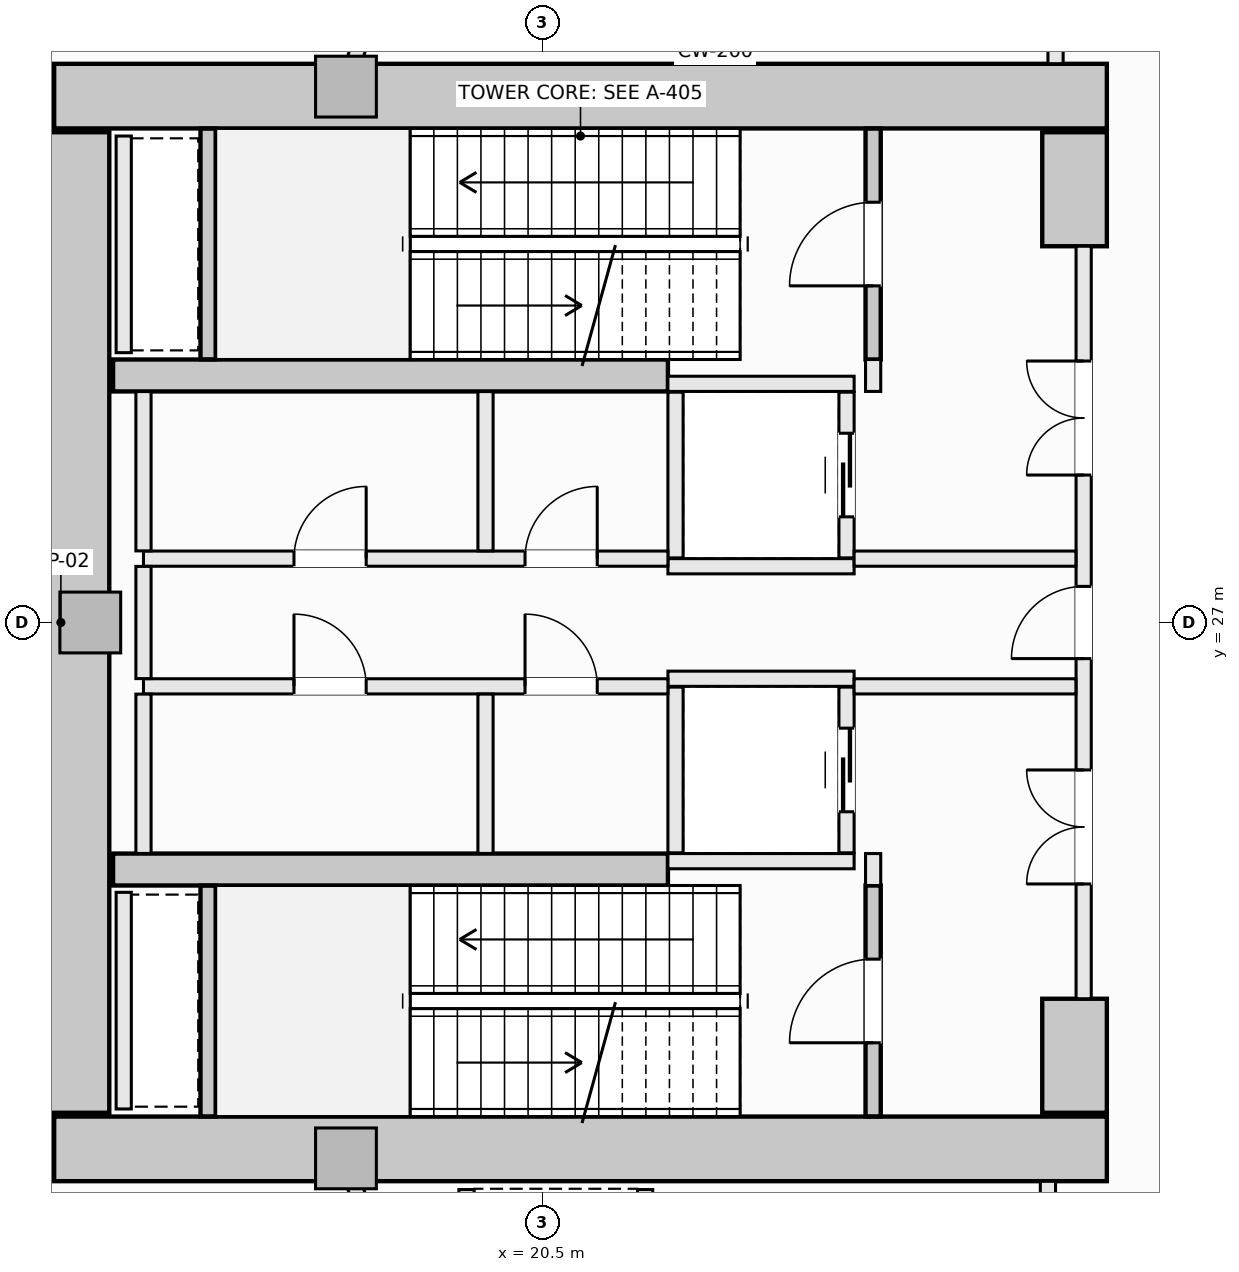
"""IFC4 building model, lengths in metres.
Left out: names, types, materials, properties, quantities, classifications, styles, units other than length and angle.
Written with IfcOpenShell. Run it as: python <this file> out.ifc"""

import sys

from ifc_helpers import new_model, si_unit, direction, frame, frame_2d, origin, origin_2d, place, context, subcontext, project, spatial, rectangle, extrude, element, fill, save


model = new_model("IFC4")
c1 = context("Model", 3, precision=1e-05, world=origin(), true_north=direction((0.0, 1.0)))
c2 = subcontext(c1, "Body", "Model", "MODEL_VIEW")
j1 = project(units=[si_unit("LENGTHUNIT", "METRE"), si_unit("PLANEANGLEUNIT", "RADIAN")], contexts=[c1])
p1 = place(None, origin())
s1 = spatial("IfcSite", under=j1, at=p1, CompositionType="ELEMENT")
p2 = place(p1, origin())
s2 = spatial("IfcBuilding", under=s1, at=p2, CompositionType="ELEMENT")
p3 = place(p2, frame((0.0, 0.0, 95.8)))
s3 = spatial("IfcBuildingStorey", under=s2, at=p3, CompositionType="ELEMENT", Elevation=95.8)
for number, where, z_axis, x_axis in (
    (1, (14.075, 33.925, -0.32), (0.0, 0.0, 1.0), (1.0, 0.0, 0.0)),
    (2, (14.075, 20.075, -0.32), (0.0, 0.0, 1.0), (1.0, 0.0, 0.0)),
):
    element("IfcWall", number, at=place(p3, frame(where, z_axis=z_axis, x_axis=x_axis)), inside=s3, PredefinedType="SHEAR", context=c2, shape_type="SweptSolid", body=[
        extrude(rectangle(XDim=13.85, YDim=0.85, at=frame_2d((6.925, 0.0))), origin(), (0.0, 0.0, 1.0), 5.04),
    ])
p4 = place(p3, frame((14.375, 20.55, -0.32), z_axis=(0.0, 0.0, 1.0), x_axis=(0.0, 1.0, 0.0)))
e3 = element("IfcWall", 3, at=p4, inside=s3, PredefinedType="SHEAR", context=c2, shape_type="SweptSolid", body=[
    extrude(rectangle(XDim=12.9, YDim=0.85, at=frame_2d((6.45, 0.0))), origin(), (0.0, 0.0, 1.0), 5.04),
])
for number, where, z_axis, x_axis in (
    (4, (27.5, 31.95, -0.32), (0.0, 0.0, 1.0), (0.0, 1.0, 0.0)),
    (5, (27.5, 20.55, -0.32), (0.0, 0.0, 1.0), (0.0, 1.0, 0.0)),
):
    element("IfcWall", number, at=place(p3, frame(where, z_axis=z_axis, x_axis=x_axis)), inside=s3, PredefinedType="SHEAR", context=c2, shape_type="SweptSolid", body=[
        extrude(rectangle(XDim=1.5, YDim=0.85, at=frame_2d((0.75, 0.0))), origin(), (0.0, 0.0, 1.0), 5.04),
    ])
for number, where, z_axis, x_axis in (
    (6, (14.85, 30.25, -0.32), (0.0, 0.0, 1.0), (1.0, 0.0, 0.0)),
    (7, (14.85, 23.75, -0.32), (0.0, 0.0, 1.0), (1.0, 0.0, 0.0)),
):
    element("IfcWall", number, at=place(p3, frame(where, z_axis=z_axis, x_axis=x_axis)), inside=s3, PredefinedType="SHEAR", context=c2, shape_type="SweptSolid", body=[
        extrude(rectangle(XDim=7.3, YDim=0.42, at=frame_2d((3.65, 0.0))), origin(), (0.0, 0.0, 1.0), 5.04),
    ])
for number, where, z_axis, x_axis in (
    (8, (17.914, 34.05, -0.32), (0.0, 0.0, 1.0), (1.0, 0.0, 0.0)),
    (9, (14.55, 27.0, -0.32), (0.0, 0.0, 1.0), (1.0, 0.0, 0.0)),
    (10, (17.914, 19.95, -0.32), (0.0, 0.0, 1.0), (1.0, 0.0, 0.0)),
):
    element("IfcColumn", number, at=place(p3, frame(where, z_axis=z_axis, x_axis=x_axis)), inside=s3, PredefinedType="PILASTER", context=c2, shape_type="SweptSolid", body=[
        extrude(rectangle(XDim=0.8, YDim=0.8, at=origin_2d()), origin(), (0.0, 0.0, 1.0), 5.04),
    ])
p5 = place(p3, frame((24.85, 30.46, -0.32), z_axis=(0.0, 0.0, 1.0), x_axis=(0.0, 1.0, 0.0)))
e11 = element("IfcWall", 11, at=p5, inside=s3, PredefinedType="SHEAR", context=c2, shape_type="SweptSolid", body=[
    extrude(rectangle(XDim=3.038, YDim=0.2, at=frame_2d((1.519, 0.0))), origin(), (0.0, 0.0, 1.0), 5.04),
])
p6 = place(p5, frame((0.969, 0.0, 0.32)))
e12 = element("IfcOpeningElement", 12, at=p6, cuts=e11, PredefinedType="OPENING", context=c2, shape_type="SweptSolid", body=[
    extrude(rectangle(XDim=1.1, YDim=2.15, at=frame_2d((0.55, 1.075))), frame((0.0, 0.11, 0.0), z_axis=(0.0, -1.0, 0.0), x_axis=(1.0, 0.0, 0.0)), (0.0, 0.0, 1.0), 0.22),
])
p7 = place(p3, frame((16.1, 30.462, -0.32), z_axis=(0.0, 0.0, 1.0), x_axis=(0.0, 1.0, 0.0)))
e13 = element("IfcWall", 13, at=p7, inside=s3, PredefinedType="SHEAR", context=c2, shape_type="SweptSolid", body=[
    extrude(rectangle(XDim=3.036, YDim=0.2, at=frame_2d((1.518, 0.0))), origin(), (0.0, 0.0, 1.0), 5.04),
])
p8 = place(p3, frame((24.85, 20.502, -0.32), z_axis=(0.0, 0.0, 1.0), x_axis=(0.0, 1.0, 0.0)))
e14 = element("IfcWall", 14, at=p8, inside=s3, PredefinedType="SHEAR", context=c2, shape_type="SweptSolid", body=[
    extrude(rectangle(XDim=3.038, YDim=0.2, at=frame_2d((1.519, 0.0))), origin(), (0.0, 0.0, 1.0), 5.04),
])
p9 = place(p8, frame((0.969, 0.0, 0.32)))
e15 = element("IfcOpeningElement", 15, at=p9, cuts=e14, PredefinedType="OPENING", context=c2, shape_type="SweptSolid", body=[
    extrude(rectangle(XDim=1.1, YDim=2.15, at=frame_2d((0.55, 1.075))), frame((0.0, 0.11, 0.0), z_axis=(0.0, -1.0, 0.0), x_axis=(1.0, 0.0, 0.0)), (0.0, 0.0, 1.0), 0.22),
])
p10 = place(p3, frame((16.1, 20.502, -0.32), z_axis=(0.0, 0.0, 1.0), x_axis=(0.0, 1.0, 0.0)))
e16 = element("IfcWall", 16, at=p10, inside=s3, PredefinedType="SHEAR", context=c2, shape_type="SweptSolid", body=[
    extrude(rectangle(XDim=3.036, YDim=0.2, at=frame_2d((1.518, 0.0))), origin(), (0.0, 0.0, 1.0), 5.04),
])
for number, where, z_axis, x_axis in (
    (17, (22.15, 30.14, 0.0), (0.0, 0.0, 1.0), (1.0, 0.0, 0.0)),
    (18, (22.15, 27.74, 0.0), (0.0, 0.0, 1.0), (1.0, 0.0, 0.0)),
):
    element("IfcWall", number, at=place(p3, frame(where, z_axis=z_axis, x_axis=x_axis)), inside=s3, PredefinedType="SOLIDWALL", context=c2, shape_type="SweptSolid", body=[
        extrude(rectangle(XDim=2.45, YDim=0.2, at=frame_2d((1.225, 0.0))), origin(), (0.0, 0.0, 1.0), 4.72),
    ])
p11 = place(p3, frame((22.25, 27.85, 0.0), z_axis=(0.0, 0.0, 1.0), x_axis=(0.0, 1.0, 0.0)))
e19 = element("IfcWall", 19, at=p11, inside=s3, PredefinedType="SOLIDWALL", context=c2, shape_type="SweptSolid", body=[
    extrude(rectangle(XDim=2.18, YDim=0.2, at=frame_2d((1.09, 0.0))), origin(), (0.0, 0.0, 1.0), 4.72),
])
p12 = place(p3, frame((24.5, 27.85, 0.0), z_axis=(0.0, 0.0, 1.0), x_axis=(0.0, 1.0, 0.0)))
e20 = element("IfcWall", 20, at=p12, inside=s3, PredefinedType="SOLIDWALL", context=c2, shape_type="SweptSolid", body=[
    extrude(rectangle(XDim=2.18, YDim=0.2, at=frame_2d((1.09, 0.0))), origin(), (0.0, 0.0, 1.0), 4.72),
])
p13 = place(p12, frame((0.54, 0.0, 0.0)))
e21 = element("IfcOpeningElement", 21, at=p13, cuts=e20, PredefinedType="OPENING", context=c2, shape_type="SweptSolid", body=[
    extrude(rectangle(XDim=1.1, YDim=2.2, at=frame_2d((0.55, 1.1))), frame((0.0, 0.11, 0.0), z_axis=(0.0, -1.0, 0.0), x_axis=(1.0, 0.0, 0.0)), (0.0, 0.0, 1.0), 0.22),
])
for number, where, z_axis, x_axis in (
    (22, (22.15, 26.26, 0.0), (0.0, 0.0, 1.0), (1.0, 0.0, 0.0)),
    (23, (22.15, 23.86, 0.0), (0.0, 0.0, 1.0), (1.0, 0.0, 0.0)),
):
    element("IfcWall", number, at=place(p3, frame(where, z_axis=z_axis, x_axis=x_axis)), inside=s3, PredefinedType="SOLIDWALL", context=c2, shape_type="SweptSolid", body=[
        extrude(rectangle(XDim=2.45, YDim=0.2, at=frame_2d((1.225, 0.0))), origin(), (0.0, 0.0, 1.0), 4.72),
    ])
p14 = place(p3, frame((22.25, 23.97, 0.0), z_axis=(0.0, 0.0, 1.0), x_axis=(0.0, 1.0, 0.0)))
e24 = element("IfcWall", 24, at=p14, inside=s3, PredefinedType="SOLIDWALL", context=c2, shape_type="SweptSolid", body=[
    extrude(rectangle(XDim=2.18, YDim=0.2, at=frame_2d((1.09, 0.0))), origin(), (0.0, 0.0, 1.0), 4.72),
])
p15 = place(p3, frame((24.5, 23.97, 0.0), z_axis=(0.0, 0.0, 1.0), x_axis=(0.0, 1.0, 0.0)))
e25 = element("IfcWall", 25, at=p15, inside=s3, PredefinedType="SOLIDWALL", context=c2, shape_type="SweptSolid", body=[
    extrude(rectangle(XDim=2.18, YDim=0.2, at=frame_2d((1.09, 0.0))), origin(), (0.0, 0.0, 1.0), 4.72),
])
p16 = place(p15, frame((0.54, 0.0, 0.0)))
e26 = element("IfcOpeningElement", 26, at=p16, cuts=e25, PredefinedType="OPENING", context=c2, shape_type="SweptSolid", body=[
    extrude(rectangle(XDim=1.1, YDim=2.2, at=frame_2d((0.55, 1.1))), frame((0.0, 0.11, 0.0), z_axis=(0.0, -1.0, 0.0), x_axis=(1.0, 0.0, 0.0)), (0.0, 0.0, 1.0), 0.22),
])
for number, where, z_axis, x_axis in (
    (27, (19.5, 17.01, 0.0), (0.0, 0.0, 1.0), (0.0, 1.0, 0.0)),
    (28, (21.85, 17.01, 0.0), (0.0, 0.0, 1.0), (0.0, 1.0, 0.0)),
):
    element("IfcWall", number, at=place(p3, frame(where, z_axis=z_axis, x_axis=x_axis)), inside=s3, PredefinedType="SOLIDWALL", context=c2, shape_type="SweptSolid", body=[
        extrude(rectangle(XDim=2.53, YDim=0.2, at=frame_2d((1.265, 0.0))), origin(), (0.0, 0.0, 1.0), 4.72),
    ])
for number, where, z_axis, x_axis in (
    (29, (14.99, 30.55, 0.0), (0.0, 0.0, 1.0), (0.0, 1.0, 0.0)),
    (30, (14.99, 20.6, 0.0), (0.0, 0.0, 1.0), (0.0, 1.0, 0.0)),
):
    element("IfcWall", number, at=place(p3, frame(where, z_axis=z_axis, x_axis=x_axis)), inside=s3, PredefinedType="SOLIDWALL", context=c2, shape_type="SweptSolid", body=[
        extrude(rectangle(XDim=2.85, YDim=0.2, at=frame_2d((1.425, 0.0))), origin(), (0.0, 0.0, 1.0), 4.72),
    ])
for number, where, z_axis, x_axis in (
    (31, (24.85, 23.54, 0.0), (0.0, 0.0, 1.0), (0.0, 1.0, 0.0)),
    (32, (24.85, 30.04, 0.0), (0.0, 0.0, 1.0), (0.0, 1.0, 0.0)),
):
    element("IfcWall", number, at=place(p3, frame(where, z_axis=z_axis, x_axis=x_axis)), inside=s3, PredefinedType="SOLIDWALL", context=c2, shape_type="SweptSolid", body=[
        extrude(rectangle(XDim=0.42, YDim=0.2, at=frame_2d((0.21, 0.0))), origin(), (0.0, 0.0, 1.0), 4.72),
    ])
p17 = place(p3, frame((27.62, 22.05, 0.0), z_axis=(0.0, 0.0, 1.0), x_axis=(0.0, 1.0, 0.0)))
e33 = element("IfcWall", 33, at=p17, inside=s3, PredefinedType="SOLIDWALL", context=c2, shape_type="SweptSolid", body=[
    extrude(rectangle(XDim=9.9, YDim=0.2, at=frame_2d((4.95, 0.0))), origin(), (0.0, 0.0, 1.0), 3.812),
])
p18 = place(p17, frame((4.475, 0.0, 0.0)))
e34 = element("IfcOpeningElement", 34, at=p18, cuts=e33, PredefinedType="OPENING", context=c2, shape_type="SweptSolid", body=[
    extrude(rectangle(XDim=0.95, YDim=2.1, at=frame_2d((0.475, 1.05))), frame((0.0, 0.11, 0.0), z_axis=(0.0, -1.0, 0.0), x_axis=(1.0, 0.0, 0.0)), (0.0, 0.0, 1.0), 0.22),
])
p19 = place(p17, frame((6.89, 0.0, 0.0)))
e35 = element("IfcOpeningElement", 35, at=p19, cuts=e33, PredefinedType="OPENING", context=c2, shape_type="SweptSolid", body=[
    extrude(rectangle(XDim=1.5, YDim=2.2, at=frame_2d((0.75, 1.1))), frame((0.0, 0.11, 0.0), z_axis=(0.0, -1.0, 0.0), x_axis=(1.0, 0.0, 0.0)), (0.0, 0.0, 1.0), 0.22),
])
p20 = place(p17, frame((1.51, 0.0, 0.0)))
e36 = element("IfcOpeningElement", 36, at=p20, cuts=e33, PredefinedType="OPENING", context=c2, shape_type="SweptSolid", body=[
    extrude(rectangle(XDim=1.5, YDim=2.2, at=frame_2d((0.75, 1.1))), frame((0.0, 0.11, 0.0), z_axis=(0.0, -1.0, 0.0), x_axis=(1.0, 0.0, 0.0)), (0.0, 0.0, 1.0), 0.22),
])
p21 = place(p3, frame((15.25, 27.84, 0.0), z_axis=(0.0, 0.0, 1.0), x_axis=(1.0, 0.0, 0.0)))
e37 = element("IfcWall", 37, at=p21, inside=s3, PredefinedType="SOLIDWALL", context=c2, shape_type="SweptSolid", body=[
    extrude(rectangle(XDim=6.9, YDim=0.2, at=frame_2d((3.45, 0.0))), origin(), (0.0, 0.0, 1.0), 4.72),
])
p22 = place(p21, frame((5.02, 0.0, 0.0)))
e38 = element("IfcOpeningElement", 38, at=p22, cuts=e37, PredefinedType="OPENING", context=c2, shape_type="SweptSolid", body=[
    extrude(rectangle(XDim=0.95, YDim=2.1, at=frame_2d((0.475, 1.05))), frame((0.0, 0.11, 0.0), z_axis=(0.0, -1.0, 0.0), x_axis=(1.0, 0.0, 0.0)), (0.0, 0.0, 1.0), 0.22),
])
p23 = place(p21, frame((1.98, 0.0, 0.0)))
e39 = element("IfcOpeningElement", 39, at=p23, cuts=e37, PredefinedType="OPENING", context=c2, shape_type="SweptSolid", body=[
    extrude(rectangle(XDim=0.95, YDim=2.1, at=frame_2d((0.475, 1.05))), frame((0.0, 0.11, 0.0), z_axis=(0.0, -1.0, 0.0), x_axis=(1.0, 0.0, 0.0)), (0.0, 0.0, 1.0), 0.22),
])
p24 = place(p3, frame((24.6, 27.84, 0.0), z_axis=(0.0, 0.0, 1.0), x_axis=(1.0, 0.0, 0.0)))
e40 = element("IfcWall", 40, at=p24, inside=s3, PredefinedType="SOLIDWALL", context=c2, shape_type="SweptSolid", body=[
    extrude(rectangle(XDim=2.918, YDim=0.2, at=frame_2d((1.459, 0.0))), origin(), (0.0, 0.0, 1.0), 4.72),
])
p25 = place(p3, frame((15.25, 26.16, 0.0), z_axis=(0.0, 0.0, 1.0), x_axis=(1.0, 0.0, 0.0)))
e41 = element("IfcWall", 41, at=p25, inside=s3, PredefinedType="SOLIDWALL", context=c2, shape_type="SweptSolid", body=[
    extrude(rectangle(XDim=6.9, YDim=0.2, at=frame_2d((3.45, 0.0))), origin(), (0.0, 0.0, 1.0), 4.72),
])
p26 = place(p25, frame((5.02, 0.0, 0.0)))
e42 = element("IfcOpeningElement", 42, at=p26, cuts=e41, PredefinedType="OPENING", context=c2, shape_type="SweptSolid", body=[
    extrude(rectangle(XDim=0.95, YDim=2.1, at=frame_2d((0.475, 1.05))), frame((0.0, 0.11, 0.0), z_axis=(0.0, -1.0, 0.0), x_axis=(1.0, 0.0, 0.0)), (0.0, 0.0, 1.0), 0.22),
])
p27 = place(p25, frame((1.98, 0.0, 0.0)))
e43 = element("IfcOpeningElement", 43, at=p27, cuts=e41, PredefinedType="OPENING", context=c2, shape_type="SweptSolid", body=[
    extrude(rectangle(XDim=0.95, YDim=2.1, at=frame_2d((0.475, 1.05))), frame((0.0, 0.11, 0.0), z_axis=(0.0, -1.0, 0.0), x_axis=(1.0, 0.0, 0.0)), (0.0, 0.0, 1.0), 0.22),
])
p28 = place(p3, frame((24.6, 26.16, 0.0), z_axis=(0.0, 0.0, 1.0), x_axis=(1.0, 0.0, 0.0)))
e44 = element("IfcWall", 44, at=p28, inside=s3, PredefinedType="SOLIDWALL", context=c2, shape_type="SweptSolid", body=[
    extrude(rectangle(XDim=2.918, YDim=0.2, at=frame_2d((1.459, 0.0))), origin(), (0.0, 0.0, 1.0), 4.72),
])
p29 = place(p3, frame((15.25, 23.962, 0.0), z_axis=(0.0, 0.0, 1.0), x_axis=(0.0, 1.0, 0.0)))
e45 = element("IfcWall", 45, at=p29, inside=s3, PredefinedType="SOLIDWALL", context=c2, shape_type="SweptSolid", body=[
    extrude(rectangle(XDim=2.096, YDim=0.2, at=frame_2d((1.048, 0.0))), origin(), (0.0, 0.0, 1.0), 4.72),
])
p30 = place(p3, frame((15.25, 26.262, 0.0), z_axis=(0.0, 0.0, 1.0), x_axis=(0.0, 1.0, 0.0)))
e46 = element("IfcWall", 46, at=p30, inside=s3, PredefinedType="SOLIDWALL", context=c2, shape_type="SweptSolid", body=[
    extrude(rectangle(XDim=1.476, YDim=0.2, at=frame_2d((0.738, 0.0))), origin(), (0.0, 0.0, 1.0), 4.72),
])
for number, where, z_axis, x_axis in (
    (47, (15.25, 27.942, 0.0), (0.0, 0.0, 1.0), (0.0, 1.0, 0.0)),
    (48, (19.75, 23.962, 0.0), (0.0, 0.0, 1.0), (0.0, 1.0, 0.0)),
    (49, (19.75, 27.942, 0.0), (0.0, 0.0, 1.0), (0.0, 1.0, 0.0)),
):
    element("IfcWall", number, at=place(p3, frame(where, z_axis=z_axis, x_axis=x_axis)), inside=s3, PredefinedType="SOLIDWALL", context=c2, shape_type="SweptSolid", body=[
        extrude(rectangle(XDim=2.096, YDim=0.2, at=frame_2d((1.048, 0.0))), origin(), (0.0, 0.0, 1.0), 4.72),
    ])
p31 = place(p3, frame((27.15, 14.902, 0.0), z_axis=(0.0, 0.0, 1.0), x_axis=(0.0, 1.0, 0.0)))
e50 = element("IfcWall", 50, at=p31, inside=s3, PredefinedType="SOLIDWALL", context=c2, shape_type="SweptSolid", body=[
    extrude(rectangle(XDim=4.746, YDim=0.2, at=frame_2d((2.373, 0.0))), origin(), (0.0, 0.0, 1.0), 4.72),
])
p32 = place(p3, frame((27.25, 34.352, 0.0), z_axis=(0.0, 0.0, 1.0), x_axis=(0.0, 1.0, 0.0)))
e51 = element("IfcWall", 51, at=p32, inside=s3, PredefinedType="SOLIDWALL", context=c2, shape_type="SweptSolid", body=[
    extrude(rectangle(XDim=0.606, YDim=0.2, at=frame_2d((0.303, 0.0))), origin(), (0.0, 0.0, 1.0), 4.72),
])
p33 = place(p3, frame((18.01, 19.648, 0.0), z_axis=(0.0, 0.0, 1.0), x_axis=(0.30441390655, -0.952539854021, 0.0)))
e52 = element("IfcWall", 52, at=p33, inside=s3, PredefinedType="SOLIDWALL", context=c2, shape_type="SweptSolid", body=[
    extrude(rectangle(XDim=0.833, YDim=0.2, at=frame_2d((0.416, 0.0))), origin(), (0.0, 0.0, 1.0), 4.084),
])
p34 = place(p3, frame((18.01, 34.352, 0.0), z_axis=(0.0, 0.0, 1.0), x_axis=(0.304472538645, 0.952521114312, 0.0)))
e53 = element("IfcWall", 53, at=p34, inside=s3, PredefinedType="SOLIDWALL", context=c2, shape_type="SweptSolid", body=[
    extrude(rectangle(XDim=0.73, YDim=0.2, at=frame_2d((0.365, 0.0))), origin(), (0.0, 0.0, 1.0), 4.72),
])
p35 = place(p6, origin())
e54 = element("IfcDoor", 54, at=p35, inside=s3, OperationType="SINGLE_SWING_LEFT", PredefinedType="DOOR", context=c2, shape_type="SweptSolid", body=[
    extrude(rectangle(XDim=1.1, YDim=2.15, at=frame_2d((0.55, 1.075))), frame((0.0, 0.025, 0.0), z_axis=(0.0, -1.0, 0.0), x_axis=(1.0, 0.0, 0.0)), (0.0, 0.0, 1.0), 0.05),
])
fill(e12, e54)
p36 = place(p9, origin())
e55 = element("IfcDoor", 55, at=p36, inside=s3, OperationType="SINGLE_SWING_LEFT", PredefinedType="DOOR", context=c2, shape_type="SweptSolid", body=[
    extrude(rectangle(XDim=1.1, YDim=2.15, at=frame_2d((0.55, 1.075))), frame((0.0, 0.025, 0.0), z_axis=(0.0, -1.0, 0.0), x_axis=(1.0, 0.0, 0.0)), (0.0, 0.0, 1.0), 0.05),
])
fill(e15, e55)
p37 = place(p13, origin())
e56 = element("IfcDoor", 56, at=p37, inside=s3, OperationType="SLIDING_TO_LEFT", PredefinedType="DOOR", context=c2, shape_type="SweptSolid", body=[
    extrude(rectangle(XDim=1.1, YDim=2.2, at=frame_2d((0.55, 1.1))), frame((0.0, 0.025, 0.0), z_axis=(0.0, -1.0, 0.0), x_axis=(1.0, 0.0, 0.0)), (0.0, 0.0, 1.0), 0.05),
])
fill(e21, e56)
p38 = place(p16, origin())
e57 = element("IfcDoor", 57, at=p38, inside=s3, OperationType="SLIDING_TO_LEFT", PredefinedType="DOOR", context=c2, shape_type="SweptSolid", body=[
    extrude(rectangle(XDim=1.1, YDim=2.2, at=frame_2d((0.55, 1.1))), frame((0.0, 0.025, 0.0), z_axis=(0.0, -1.0, 0.0), x_axis=(1.0, 0.0, 0.0)), (0.0, 0.0, 1.0), 0.05),
])
fill(e26, e57)
p39 = place(p18, origin())
e58 = element("IfcDoor", 58, at=p39, inside=s3, OperationType="SINGLE_SWING_LEFT", PredefinedType="DOOR", context=c2, shape_type="SweptSolid", body=[
    extrude(rectangle(XDim=0.95, YDim=2.1, at=frame_2d((0.475, 1.05))), frame((0.0, 0.025, 0.0), z_axis=(0.0, -1.0, 0.0), x_axis=(1.0, 0.0, 0.0)), (0.0, 0.0, 1.0), 0.05),
])
fill(e34, e58)
p40 = place(p19, origin())
e59 = element("IfcDoor", 59, at=p40, inside=s3, OperationType="DOUBLE_DOOR_SINGLE_SWING", PredefinedType="DOOR", context=c2, shape_type="SweptSolid", body=[
    extrude(rectangle(XDim=1.5, YDim=2.2, at=frame_2d((0.75, 1.1))), frame((0.0, 0.025, 0.0), z_axis=(0.0, -1.0, 0.0), x_axis=(1.0, 0.0, 0.0)), (0.0, 0.0, 1.0), 0.05),
])
fill(e35, e59)
p41 = place(p20, origin())
e60 = element("IfcDoor", 60, at=p41, inside=s3, OperationType="DOUBLE_DOOR_SINGLE_SWING", PredefinedType="DOOR", context=c2, shape_type="SweptSolid", body=[
    extrude(rectangle(XDim=1.5, YDim=2.2, at=frame_2d((0.75, 1.1))), frame((0.0, 0.025, 0.0), z_axis=(0.0, -1.0, 0.0), x_axis=(1.0, 0.0, 0.0)), (0.0, 0.0, 1.0), 0.05),
])
fill(e36, e60)
p42 = place(p22, origin())
e61 = element("IfcDoor", 61, at=p42, inside=s3, OperationType="SINGLE_SWING_RIGHT", PredefinedType="DOOR", context=c2, shape_type="SweptSolid", body=[
    extrude(rectangle(XDim=0.95, YDim=2.1, at=frame_2d((0.475, 1.05))), frame((0.0, 0.025, 0.0), z_axis=(0.0, -1.0, 0.0), x_axis=(1.0, 0.0, 0.0)), (0.0, 0.0, 1.0), 0.05),
])
fill(e38, e61)
p43 = place(p26, origin())
e62 = element("IfcDoor", 62, at=p43, inside=s3, OperationType="SINGLE_SWING_LEFT", PredefinedType="DOOR", context=c2, shape_type="SweptSolid", body=[
    extrude(rectangle(XDim=0.95, YDim=2.1, at=frame_2d((0.475, 1.05))), frame((0.0, 0.025, 0.0), z_axis=(0.0, -1.0, 0.0), x_axis=(1.0, 0.0, 0.0)), (0.0, 0.0, 1.0), 0.05),
])
fill(e42, e62)
p44 = place(p23, origin())
e63 = element("IfcDoor", 63, at=p44, inside=s3, OperationType="SINGLE_SWING_RIGHT", PredefinedType="DOOR", context=c2, shape_type="SweptSolid", body=[
    extrude(rectangle(XDim=0.95, YDim=2.1, at=frame_2d((0.475, 1.05))), frame((0.0, 0.025, 0.0), z_axis=(0.0, -1.0, 0.0), x_axis=(1.0, 0.0, 0.0)), (0.0, 0.0, 1.0), 0.05),
])
fill(e39, e63)
p45 = place(p27, origin())
e64 = element("IfcDoor", 64, at=p45, inside=s3, OperationType="SINGLE_SWING_LEFT", PredefinedType="DOOR", context=c2, shape_type="SweptSolid", body=[
    extrude(rectangle(XDim=0.95, YDim=2.1, at=frame_2d((0.475, 1.05))), frame((0.0, 0.025, 0.0), z_axis=(0.0, -1.0, 0.0), x_axis=(1.0, 0.0, 0.0)), (0.0, 0.0, 1.0), 0.05),
])
fill(e43, e64)
save(model, sys.argv[1])
